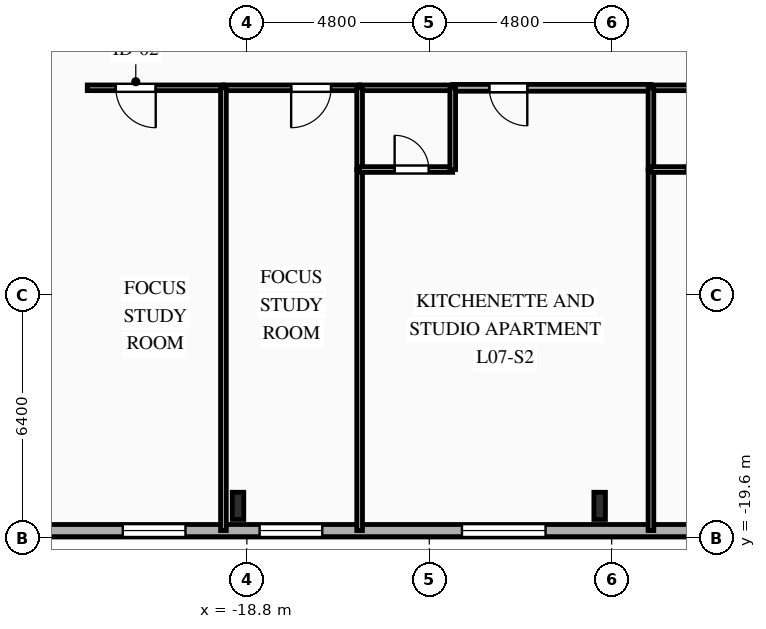
"""IFC4 building model, lengths in metres.
Left out: names, types, materials, properties, quantities, classifications, styles, units other than length and angle.
Written with IfcOpenShell. Run it as: python <this file> out.ifc"""

import sys

from ifc_helpers import new_model, si_unit, direction, frame, frame_2d, origin, origin_2d, place, context, subcontext, project, spatial, rectangle, i_section, extrude, element, fill, save


model = new_model("IFC4")
c1 = context("Model", 3, precision=1e-05, world=origin(), true_north=direction((0.0, 1.0)))
c2 = subcontext(c1, "Body", "Model", "MODEL_VIEW")
j1 = project(units=[si_unit("LENGTHUNIT", "METRE"), si_unit("PLANEANGLEUNIT", "RADIAN")], contexts=[c1])
p1 = place(None, origin())
s1 = spatial("IfcSite", under=j1, at=p1, CompositionType="ELEMENT")
p2 = place(p1, origin())
s2 = spatial("IfcBuilding", under=s1, at=p2, CompositionType="ELEMENT")
p3 = place(p2, frame((0.0, 0.0, 30.35)))
s3 = spatial("IfcBuildingStorey", under=s2, at=p3, CompositionType="ELEMENT", Elevation=30.35)
for number, where, z_axis, x_axis in (
    (1, (-19.033, -18.75, 0.0), (0.0, 0.0, 1.0), (1.0, 0.0, 0.0)),
    (2, (-9.517, -18.75, 0.0), (0.0, 0.0, 1.0), (1.0, 0.0, 0.0)),
):
    element("IfcColumn", number, at=place(p3, frame(where, z_axis=z_axis, x_axis=x_axis)), inside=s3, PredefinedType="COLUMN", context=c2, shape_type="SweptSolid", body=[
        extrude(i_section(OverallWidth=0.304, OverallDepth=0.716, WebThickness=0.021, FlangeThickness=0.04, FilletRadius=0.027, at=origin_2d()), origin(), (0.0, 0.0, 1.0), 3.35),
    ])
p4 = place(p3, frame((29.2, -19.4, 0.0), z_axis=(0.0, 0.0, 1.0), x_axis=(-1.0, 0.0, 0.0)))
e3 = element("IfcWall", 3, at=p4, inside=s3, PredefinedType="SOLIDWALL", context=c2, shape_type="SweptSolid", body=[
    extrude(rectangle(XDim=58.4, YDim=0.32, at=frame_2d((29.2, 0.0))), origin(), (0.0, 0.0, 1.0), 3.035),
])
p5 = place(p4, frame((7.455, 0.0, 0.85)))
e4 = element("IfcOpeningElement", 4, at=p5, cuts=e3, PredefinedType="OPENING", context=c2, shape_type="SweptSolid", body=[
    extrude(rectangle(XDim=1.65, YDim=1.85, at=frame_2d((0.825, 0.925))), frame((0.0, 0.17, 0.0), z_axis=(0.0, -1.0, 0.0), x_axis=(1.0, 0.0, 0.0)), (0.0, 0.0, 1.0), 0.34),
])
p6 = place(p4, frame((11.535, 0.0, 0.85)))
e5 = element("IfcOpeningElement", 5, at=p6, cuts=e3, PredefinedType="OPENING", context=c2, shape_type="SweptSolid", body=[
    extrude(rectangle(XDim=1.65, YDim=1.85, at=frame_2d((0.825, 0.925))), frame((0.0, 0.17, 0.0), z_axis=(0.0, -1.0, 0.0), x_axis=(1.0, 0.0, 0.0)), (0.0, 0.0, 1.0), 0.34),
])
p7 = place(p4, frame((17.14, 0.0, 0.85)))
e6 = element("IfcOpeningElement", 6, at=p7, cuts=e3, PredefinedType="OPENING", context=c2, shape_type="SweptSolid", body=[
    extrude(rectangle(XDim=2.2, YDim=1.85, at=frame_2d((1.1, 0.925))), frame((0.0, 0.17, 0.0), z_axis=(0.0, -1.0, 0.0), x_axis=(1.0, 0.0, 0.0)), (0.0, 0.0, 1.0), 0.34),
])
p8 = place(p4, frame((24.82, 0.0, 0.85)))
e7 = element("IfcOpeningElement", 7, at=p8, cuts=e3, PredefinedType="OPENING", context=c2, shape_type="SweptSolid", body=[
    extrude(rectangle(XDim=2.2, YDim=1.85, at=frame_2d((1.1, 0.925))), frame((0.0, 0.17, 0.0), z_axis=(0.0, -1.0, 0.0), x_axis=(1.0, 0.0, 0.0)), (0.0, 0.0, 1.0), 0.34),
])
p9 = place(p4, frame((32.5, 0.0, 0.85)))
e8 = element("IfcOpeningElement", 8, at=p9, cuts=e3, PredefinedType="OPENING", context=c2, shape_type="SweptSolid", body=[
    extrude(rectangle(XDim=2.2, YDim=1.85, at=frame_2d((1.1, 0.925))), frame((0.0, 0.17, 0.0), z_axis=(0.0, -1.0, 0.0), x_axis=(1.0, 0.0, 0.0)), (0.0, 0.0, 1.0), 0.34),
])
p10 = place(p4, frame((40.14, 0.0, 0.85)))
e9 = element("IfcOpeningElement", 9, at=p10, cuts=e3, PredefinedType="OPENING", context=c2, shape_type="SweptSolid", body=[
    extrude(rectangle(XDim=2.2, YDim=1.85, at=frame_2d((1.1, 0.925))), frame((0.0, 0.17, 0.0), z_axis=(0.0, -1.0, 0.0), x_axis=(1.0, 0.0, 0.0)), (0.0, 0.0, 1.0), 0.34),
])
p11 = place(p4, frame((46.015, 0.0, 0.85)))
e10 = element("IfcOpeningElement", 10, at=p11, cuts=e3, PredefinedType="OPENING", context=c2, shape_type="SweptSolid", body=[
    extrude(rectangle(XDim=1.65, YDim=1.85, at=frame_2d((0.825, 0.925))), frame((0.0, 0.17, 0.0), z_axis=(0.0, -1.0, 0.0), x_axis=(1.0, 0.0, 0.0)), (0.0, 0.0, 1.0), 0.34),
])
p12 = place(p4, frame((49.615, 0.0, 0.85)))
e11 = element("IfcOpeningElement", 11, at=p12, cuts=e3, PredefinedType="OPENING", context=c2, shape_type="SweptSolid", body=[
    extrude(rectangle(XDim=1.65, YDim=1.85, at=frame_2d((0.825, 0.925))), frame((0.0, 0.17, 0.0), z_axis=(0.0, -1.0, 0.0), x_axis=(1.0, 0.0, 0.0)), (0.0, 0.0, 1.0), 0.34),
])
p13 = place(p3, frame((-19.417, -7.75, 0.0), z_axis=(0.0, 0.0, 1.0), x_axis=(-1.0, 0.0, 0.0)))
e12 = element("IfcWall", 12, at=p13, inside=s3, PredefinedType="PARTITIONING", context=c2, shape_type="SweptSolid", body=[
    extrude(rectangle(XDim=3.583, YDim=0.15, at=frame_2d((1.792, 0.0))), origin(), (0.0, 0.0, 1.0), 3.035),
])
p14 = place(p13, frame((1.782, 0.0, 0.0)))
e13 = element("IfcOpeningElement", 13, at=p14, cuts=e12, PredefinedType="OPENING", context=c2, shape_type="SweptSolid", body=[
    extrude(rectangle(XDim=1.05, YDim=2.15, at=frame_2d((0.525, 1.075))), frame((0.0, 0.085, 0.0), z_axis=(0.0, -1.0, 0.0), x_axis=(1.0, 0.0, 0.0)), (0.0, 0.0, 1.0), 0.17),
])
p15 = place(p3, frame((-15.833, -7.75, 0.0), z_axis=(0.0, 0.0, 1.0), x_axis=(-1.0, 0.0, 0.0)))
e14 = element("IfcWall", 14, at=p15, inside=s3, PredefinedType="PARTITIONING", context=c2, shape_type="SweptSolid", body=[
    extrude(rectangle(XDim=3.583, YDim=0.15, at=frame_2d((1.792, 0.0))), origin(), (0.0, 0.0, 1.0), 3.035),
])
p16 = place(p15, frame((0.752, 0.0, 0.0)))
e15 = element("IfcOpeningElement", 15, at=p16, cuts=e14, PredefinedType="OPENING", context=c2, shape_type="SweptSolid", body=[
    extrude(rectangle(XDim=1.05, YDim=2.15, at=frame_2d((0.525, 1.075))), frame((0.0, 0.085, 0.0), z_axis=(0.0, -1.0, 0.0), x_axis=(1.0, 0.0, 0.0)), (0.0, 0.0, 1.0), 0.17),
])
p17 = place(p3, frame((-8.167, -7.75, 0.0), z_axis=(0.0, 0.0, 1.0), x_axis=(-1.0, 0.0, 0.0)))
e16 = element("IfcWall", 16, at=p17, inside=s3, PredefinedType="PARTITIONING", context=c2, shape_type="SweptSolid", body=[
    extrude(rectangle(XDim=5.216, YDim=0.18, at=frame_2d((2.608, 0.0))), origin(), (0.0, 0.0, 1.0), 3.035),
])
p18 = place(p17, frame((3.254, 0.0, 0.0)))
e17 = element("IfcOpeningElement", 17, at=p18, cuts=e16, PredefinedType="OPENING", context=c2, shape_type="SweptSolid", body=[
    extrude(rectangle(XDim=1.0, YDim=2.15, at=frame_2d((0.5, 1.075))), frame((0.0, 0.1, 0.0), z_axis=(0.0, -1.0, 0.0), x_axis=(1.0, 0.0, 0.0)), (0.0, 0.0, 1.0), 0.2),
])
for number, where, z_axis, x_axis in (
    (18, (-13.383, -7.75, 0.0), (0.0, 0.0, 1.0), (-1.0, 0.0, 0.0)),
    (19, (-5.717, -7.75, 0.0), (0.0, 0.0, 1.0), (-1.0, 0.0, 0.0)),
):
    element("IfcWall", number, at=place(p3, frame(where, z_axis=z_axis, x_axis=x_axis)), inside=s3, PredefinedType="PLUMBINGWALL", context=c2, shape_type="SweptSolid", body=[
        extrude(rectangle(XDim=2.45, YDim=0.15, at=frame_2d((1.225, 0.0))), origin(), (0.0, 0.0, 1.0), 3.035),
    ])
p19 = place(p3, frame((-19.417, -7.75, 0.0), z_axis=(0.0, 0.0, 1.0), x_axis=(0.0, -1.0, 0.0)))
e20 = element("IfcWall", 20, at=p19, inside=s3, PredefinedType="PARTITIONING", context=c2, shape_type="SweptSolid", body=[
    extrude(rectangle(XDim=11.65, YDim=0.15, at=frame_2d((5.825, 0.0))), origin(), (0.0, 0.0, 1.0), 3.035),
])
p20 = place(p3, frame((-15.833, -9.9, 0.0), z_axis=(0.0, 0.0, 1.0), x_axis=(0.0, -1.0, 0.0)))
e21 = element("IfcWall", 21, at=p20, inside=s3, PredefinedType="PARTITIONING", context=c2, shape_type="SweptSolid", body=[
    extrude(rectangle(XDim=9.5, YDim=0.15, at=frame_2d((4.75, 0.0))), origin(), (0.0, 0.0, 1.0), 3.035),
])
p21 = place(p3, frame((-15.833, -7.75, 0.0), z_axis=(0.0, 0.0, 1.0), x_axis=(0.0, -1.0, 0.0)))
e22 = element("IfcWall", 22, at=p21, inside=s3, PredefinedType="PLUMBINGWALL", context=c2, shape_type="SweptSolid", body=[
    extrude(rectangle(XDim=2.15, YDim=0.15, at=frame_2d((1.075, 0.0))), origin(), (0.0, 0.0, 1.0), 3.035),
])
p22 = place(p3, frame((-15.833, -9.9, 0.0), z_axis=(0.0, 0.0, 1.0), x_axis=(1.0, 0.0, 0.0)))
e23 = element("IfcWall", 23, at=p22, inside=s3, PredefinedType="PLUMBINGWALL", context=c2, shape_type="SweptSolid", body=[
    extrude(rectangle(XDim=2.45, YDim=0.15, at=frame_2d((1.225, 0.0))), origin(), (0.0, 0.0, 1.0), 3.035),
])
p23 = place(p22, frame((0.921, 0.0, 0.0)))
e24 = element("IfcOpeningElement", 24, at=p23, cuts=e23, PredefinedType="OPENING", context=c2, shape_type="SweptSolid", body=[
    extrude(rectangle(XDim=0.9, YDim=2.1, at=frame_2d((0.45, 1.05))), frame((0.0, 0.085, 0.0), z_axis=(0.0, -1.0, 0.0), x_axis=(1.0, 0.0, 0.0)), (0.0, 0.0, 1.0), 0.17),
])
p24 = place(p3, frame((-13.383, -9.9, 0.0), z_axis=(0.0, 0.0, 1.0), x_axis=(0.0, 1.0, 0.0)))
e25 = element("IfcWall", 25, at=p24, inside=s3, PredefinedType="PLUMBINGWALL", context=c2, shape_type="SweptSolid", body=[
    extrude(rectangle(XDim=2.15, YDim=0.15, at=frame_2d((1.075, 0.0))), origin(), (0.0, 0.0, 1.0), 3.035),
])
p25 = place(p3, frame((-8.167, -9.9, 0.0), z_axis=(0.0, 0.0, 1.0), x_axis=(0.0, -1.0, 0.0)))
e26 = element("IfcWall", 26, at=p25, inside=s3, PredefinedType="PARTITIONING", context=c2, shape_type="SweptSolid", body=[
    extrude(rectangle(XDim=9.5, YDim=0.15, at=frame_2d((4.75, 0.0))), origin(), (0.0, 0.0, 1.0), 3.035),
])
p26 = place(p3, frame((-8.167, -7.75, 0.0), z_axis=(0.0, 0.0, 1.0), x_axis=(0.0, -1.0, 0.0)))
e27 = element("IfcWall", 27, at=p26, inside=s3, PredefinedType="PLUMBINGWALL", context=c2, shape_type="SweptSolid", body=[
    extrude(rectangle(XDim=2.15, YDim=0.15, at=frame_2d((1.075, 0.0))), origin(), (0.0, 0.0, 1.0), 3.035),
])
p27 = place(p3, frame((-8.167, -9.9, 0.0), z_axis=(0.0, 0.0, 1.0), x_axis=(1.0, 0.0, 0.0)))
e28 = element("IfcWall", 28, at=p27, inside=s3, PredefinedType="PLUMBINGWALL", context=c2, shape_type="SweptSolid", body=[
    extrude(rectangle(XDim=2.45, YDim=0.15, at=frame_2d((1.225, 0.0))), origin(), (0.0, 0.0, 1.0), 3.035),
])
p28 = place(p27, frame((0.921, 0.0, 0.0)))
e29 = element("IfcOpeningElement", 29, at=p28, cuts=e28, PredefinedType="OPENING", context=c2, shape_type="SweptSolid", body=[
    extrude(rectangle(XDim=0.9, YDim=2.1, at=frame_2d((0.45, 1.05))), frame((0.0, 0.085, 0.0), z_axis=(0.0, -1.0, 0.0), x_axis=(1.0, 0.0, 0.0)), (0.0, 0.0, 1.0), 0.17),
])
p29 = place(p10, origin())
e30 = element("IfcWindow", 30, at=p29, inside=s3, PartitioningType="SINGLE_PANEL", PredefinedType="WINDOW", context=c2, shape_type="SweptSolid", body=[
    extrude(rectangle(XDim=2.2, YDim=1.85, at=frame_2d((1.1, 0.925))), frame((0.0, 0.03, 0.0), z_axis=(0.0, -1.0, 0.0), x_axis=(1.0, 0.0, 0.0)), (0.0, 0.0, 1.0), 0.06),
])
fill(e9, e30)
p30 = place(p11, origin())
e31 = element("IfcWindow", 31, at=p30, inside=s3, PartitioningType="SINGLE_PANEL", PredefinedType="WINDOW", context=c2, shape_type="SweptSolid", body=[
    extrude(rectangle(XDim=1.65, YDim=1.85, at=frame_2d((0.825, 0.925))), frame((0.0, 0.03, 0.0), z_axis=(0.0, -1.0, 0.0), x_axis=(1.0, 0.0, 0.0)), (0.0, 0.0, 1.0), 0.06),
])
fill(e10, e31)
p31 = place(p12, origin())
e32 = element("IfcWindow", 32, at=p31, inside=s3, PartitioningType="SINGLE_PANEL", PredefinedType="WINDOW", context=c2, shape_type="SweptSolid", body=[
    extrude(rectangle(XDim=1.65, YDim=1.85, at=frame_2d((0.825, 0.925))), frame((0.0, 0.03, 0.0), z_axis=(0.0, -1.0, 0.0), x_axis=(1.0, 0.0, 0.0)), (0.0, 0.0, 1.0), 0.06),
])
fill(e11, e32)
p32 = place(p14, origin())
e33 = element("IfcDoor", 33, at=p32, inside=s3, OperationType="SINGLE_SWING_LEFT", PredefinedType="DOOR", context=c2, shape_type="SweptSolid", body=[
    extrude(rectangle(XDim=1.05, YDim=2.15, at=frame_2d((0.525, 1.075))), frame((0.0, 0.025, 0.0), z_axis=(0.0, -1.0, 0.0), x_axis=(1.0, 0.0, 0.0)), (0.0, 0.0, 1.0), 0.05),
])
fill(e13, e33)
p33 = place(p16, origin())
e34 = element("IfcDoor", 34, at=p33, inside=s3, OperationType="SINGLE_SWING_RIGHT", PredefinedType="DOOR", context=c2, shape_type="SweptSolid", body=[
    extrude(rectangle(XDim=1.05, YDim=2.15, at=frame_2d((0.525, 1.075))), frame((0.0, 0.025, 0.0), z_axis=(0.0, -1.0, 0.0), x_axis=(1.0, 0.0, 0.0)), (0.0, 0.0, 1.0), 0.05),
])
fill(e15, e34)
p34 = place(p18, origin())
e35 = element("IfcDoor", 35, at=p34, inside=s3, OperationType="SINGLE_SWING_LEFT", PredefinedType="DOOR", context=c2, shape_type="SweptSolid", body=[
    extrude(rectangle(XDim=1.0, YDim=2.15, at=frame_2d((0.5, 1.075))), frame((0.0, 0.025, 0.0), z_axis=(0.0, -1.0, 0.0), x_axis=(1.0, 0.0, 0.0)), (0.0, 0.0, 1.0), 0.05),
])
fill(e17, e35)
p35 = place(p23, origin())
e36 = element("IfcDoor", 36, at=p35, inside=s3, OperationType="SINGLE_SWING_LEFT", PredefinedType="DOOR", context=c2, shape_type="SweptSolid", body=[
    extrude(rectangle(XDim=0.9, YDim=2.1, at=frame_2d((0.45, 1.05))), frame((0.0, 0.025, 0.0), z_axis=(0.0, -1.0, 0.0), x_axis=(1.0, 0.0, 0.0)), (0.0, 0.0, 1.0), 0.05),
])
fill(e24, e36)
p36 = place(p28, origin())
e37 = element("IfcDoor", 37, at=p36, inside=s3, OperationType="SINGLE_SWING_RIGHT", PredefinedType="DOOR", context=c2, shape_type="SweptSolid", body=[
    extrude(rectangle(XDim=0.9, YDim=2.1, at=frame_2d((0.45, 1.05))), frame((0.0, 0.025, 0.0), z_axis=(0.0, -1.0, 0.0), x_axis=(1.0, 0.0, 0.0)), (0.0, 0.0, 1.0), 0.05),
])
fill(e29, e37)
save(model, sys.argv[1])
